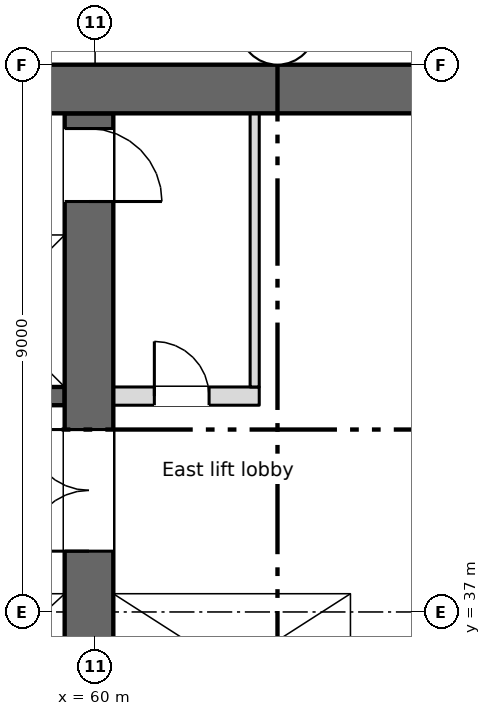
"""IFC4 building model, lengths in metres.
Left out: names, types, materials, properties, quantities, classifications, styles, units other than length and angle.
Written with IfcOpenShell. Run it as: python <this file> out.ifc"""

import sys

from ifc_helpers import new_model, si_unit, direction, frame, frame_2d, origin, place, context, subcontext, project, spatial, rectangle, extrude, element, fill, save


model = new_model("IFC4")
c1 = context("Model", 3, precision=1e-05, world=origin(), true_north=direction((0.0, 1.0)))
c2 = subcontext(c1, "Body", "Model", "MODEL_VIEW")
j1 = project(units=[si_unit("LENGTHUNIT", "METRE"), si_unit("PLANEANGLEUNIT", "RADIAN")], contexts=[c1])
p1 = place(None, origin())
s1 = spatial("IfcSite", under=j1, at=p1, CompositionType="ELEMENT")
p2 = place(p1, origin())
s2 = spatial("IfcBuilding", under=s1, at=p2, CompositionType="ELEMENT")
p3 = place(p2, frame((0.0, 0.0, 125.0)))
s3 = spatial("IfcBuildingStorey", under=s2, at=p3, CompositionType="ELEMENT", Elevation=125.0)
p4 = place(p3, frame((5.55, 45.6, 0.0), z_axis=(0.0, 0.0, 1.0), x_axis=(1.0, 0.0, 0.0)))
e1 = element("IfcWall", 1, at=p4, inside=s3, PredefinedType="SHEAR", context=c2, shape_type="SweptSolid", body=[
    extrude(rectangle(XDim=60.9, YDim=0.8, at=frame_2d((30.45, 0.0))), origin(), (0.0, 0.0, 1.0), 3.35),
])
p5 = place(p4, frame((7.2, 0.0, 0.6)))
e2 = element("IfcOpeningElement", 2, at=p5, cuts=e1, PredefinedType="OPENING", context=c2, shape_type="SweptSolid", body=[
    extrude(rectangle(XDim=0.6, YDim=2.4, at=frame_2d((0.3, 1.2))), frame((0.0, 0.41, 0.0), z_axis=(0.0, -1.0, 0.0), x_axis=(1.0, 0.0, 0.0)), (0.0, 0.0, 1.0), 0.82),
])
p6 = place(p3, frame((64.35, 34.8, 0.0), z_axis=(0.0, 0.0, 1.0), x_axis=(0.0, 1.0, 0.0)))
e3 = element("IfcWall", 3, at=p6, inside=s3, PredefinedType="SHEAR", context=c2, shape_type="SweptSolid", body=[
    extrude(rectangle(XDim=10.4, YDim=0.3, at=frame_2d((5.2, 0.0))), origin(), (0.0, 0.0, 1.0), 3.35),
])
p7 = place(p3, frame((59.9, 28.4, 0.0), z_axis=(0.0, 0.0, 1.0), x_axis=(0.0, 1.0, 0.0)))
e4 = element("IfcWall", 4, at=p7, inside=s3, PredefinedType="SHEAR", context=c2, shape_type="SweptSolid", body=[
    extrude(rectangle(XDim=16.8, YDim=0.8, at=frame_2d((8.4, 0.0))), origin(), (0.0, 0.0, 1.0), 3.35),
])
p8 = place(p7, frame((9.6, 0.0, 0.0)))
e5 = element("IfcOpeningElement", 5, at=p8, cuts=e4, PredefinedType="OPENING", context=c2, shape_type="SweptSolid", body=[
    extrude(rectangle(XDim=2.0, YDim=2.1, at=frame_2d((1.0, 1.05))), frame((0.0, 0.41, 0.0), z_axis=(0.0, -1.0, 0.0), x_axis=(1.0, 0.0, 0.0)), (0.0, 0.0, 1.0), 0.82),
])
p9 = place(p7, frame((15.35, 0.0, 0.0)))
e6 = element("IfcOpeningElement", 6, at=p9, cuts=e4, PredefinedType="OPENING", context=c2, shape_type="SweptSolid", body=[
    extrude(rectangle(XDim=1.2, YDim=2.1, at=frame_2d((0.6, 1.05))), frame((0.0, 0.41, 0.0), z_axis=(0.0, -1.0, 0.0), x_axis=(1.0, 0.0, 0.0)), (0.0, 0.0, 1.0), 0.82),
])
p10 = place(p3, frame((47.3, 37.45, 0.0), z_axis=(0.0, 0.0, 1.0), x_axis=(1.0, 0.0, 0.0)))
e7 = element("IfcWall", 7, at=p10, inside=s3, PredefinedType="SHEAR", context=c2, shape_type="SweptSolid", body=[
    extrude(rectangle(XDim=12.2, YDim=0.3, at=frame_2d((6.1, 0.0))), origin(), (0.0, 0.0, 1.0), 3.35),
])
p11 = place(p10, frame((4.3, 0.0, 0.0)))
e8 = element("IfcOpeningElement", 8, at=p11, cuts=e7, PredefinedType="OPENING", context=c2, shape_type="SweptSolid", body=[
    extrude(rectangle(XDim=1.1, YDim=2.1, at=frame_2d((0.55, 1.05))), frame((0.0, 0.16, 0.0), z_axis=(0.0, -1.0, 0.0), x_axis=(1.0, 0.0, 0.0)), (0.0, 0.0, 1.0), 0.32),
])
p12 = place(p10, frame((7.3, 0.0, 0.0)))
e9 = element("IfcOpeningElement", 9, at=p12, cuts=e7, PredefinedType="OPENING", context=c2, shape_type="SweptSolid", body=[
    extrude(rectangle(XDim=1.1, YDim=2.1, at=frame_2d((0.55, 1.05))), frame((0.0, 0.16, 0.0), z_axis=(0.0, -1.0, 0.0), x_axis=(1.0, 0.0, 0.0)), (0.0, 0.0, 1.0), 0.32),
])
p13 = place(p10, frame((10.3, 0.0, 0.0)))
e10 = element("IfcOpeningElement", 10, at=p13, cuts=e7, PredefinedType="OPENING", context=c2, shape_type="SweptSolid", body=[
    extrude(rectangle(XDim=1.1, YDim=2.1, at=frame_2d((0.55, 1.05))), frame((0.0, 0.16, 0.0), z_axis=(0.0, -1.0, 0.0), x_axis=(1.0, 0.0, 0.0)), (0.0, 0.0, 1.0), 0.32),
])
p14 = place(p3, frame((60.3, 37.45, 0.0), z_axis=(0.0, 0.0, 1.0), x_axis=(1.0, 0.0, 0.0)))
e11 = element("IfcWall", 11, at=p14, inside=s3, PredefinedType="SHEAR", context=c2, shape_type="SweptSolid", body=[
    extrude(rectangle(XDim=3.9, YDim=0.3, at=frame_2d((1.95, 0.0))), origin(), (0.0, 0.0, 1.0), 3.35),
])
p15 = place(p14, frame((1.4, 0.0, 0.0)))
e12 = element("IfcOpeningElement", 12, at=p15, cuts=e11, PredefinedType="OPENING", context=c2, shape_type="SweptSolid", body=[
    extrude(rectangle(XDim=1.1, YDim=2.1, at=frame_2d((0.55, 1.05))), frame((0.0, 0.16, 0.0), z_axis=(0.0, -1.0, 0.0), x_axis=(1.0, 0.0, 0.0)), (0.0, 0.0, 1.0), 0.32),
])
p16 = place(p3, frame((18.5, 40.55, 0.0), z_axis=(0.0, 0.0, 1.0), x_axis=(1.0, 0.0, 0.0)))
e13 = element("IfcWall", 13, at=p16, inside=s3, PredefinedType="SHEAR", context=c2, shape_type="SweptSolid", body=[
    extrude(rectangle(XDim=41.0, YDim=0.3, at=frame_2d((20.5, 0.0))), origin(), (0.0, 0.0, 1.0), 3.35),
])
p17 = place(p16, frame((18.65, 0.0, 0.0)))
e14 = element("IfcOpeningElement", 14, at=p17, cuts=e13, PredefinedType="OPENING", context=c2, shape_type="SweptSolid", body=[
    extrude(rectangle(XDim=0.9, YDim=2.1, at=frame_2d((0.45, 1.05))), frame((0.0, 0.16, 0.0), z_axis=(0.0, -1.0, 0.0), x_axis=(1.0, 0.0, 0.0)), (0.0, 0.0, 1.0), 0.32),
])
p18 = place(p16, frame((6.175, 0.0, 0.0)))
e15 = element("IfcOpeningElement", 15, at=p18, cuts=e13, PredefinedType="OPENING", context=c2, shape_type="SweptSolid", body=[
    extrude(rectangle(XDim=1.1, YDim=2.1, at=frame_2d((0.55, 1.05))), frame((0.0, 0.16, 0.0), z_axis=(0.0, -1.0, 0.0), x_axis=(1.0, 0.0, 0.0)), (0.0, 0.0, 1.0), 0.32),
])
p19 = place(p16, frame((8.925, 0.0, 0.0)))
e16 = element("IfcOpeningElement", 16, at=p19, cuts=e13, PredefinedType="OPENING", context=c2, shape_type="SweptSolid", body=[
    extrude(rectangle(XDim=1.1, YDim=2.1, at=frame_2d((0.55, 1.05))), frame((0.0, 0.16, 0.0), z_axis=(0.0, -1.0, 0.0), x_axis=(1.0, 0.0, 0.0)), (0.0, 0.0, 1.0), 0.32),
])
p20 = place(p16, frame((11.675, 0.0, 0.0)))
e17 = element("IfcOpeningElement", 17, at=p20, cuts=e13, PredefinedType="OPENING", context=c2, shape_type="SweptSolid", body=[
    extrude(rectangle(XDim=1.1, YDim=2.1, at=frame_2d((0.55, 1.05))), frame((0.0, 0.16, 0.0), z_axis=(0.0, -1.0, 0.0), x_axis=(1.0, 0.0, 0.0)), (0.0, 0.0, 1.0), 0.32),
])
p21 = place(p16, frame((30.925, 0.0, 0.0)))
e18 = element("IfcOpeningElement", 18, at=p21, cuts=e13, PredefinedType="OPENING", context=c2, shape_type="SweptSolid", body=[
    extrude(rectangle(XDim=1.1, YDim=2.1, at=frame_2d((0.55, 1.05))), frame((0.0, 0.16, 0.0), z_axis=(0.0, -1.0, 0.0), x_axis=(1.0, 0.0, 0.0)), (0.0, 0.0, 1.0), 0.32),
])
p22 = place(p16, frame((33.675, 0.0, 0.0)))
e19 = element("IfcOpeningElement", 19, at=p22, cuts=e13, PredefinedType="OPENING", context=c2, shape_type="SweptSolid", body=[
    extrude(rectangle(XDim=1.1, YDim=2.1, at=frame_2d((0.55, 1.05))), frame((0.0, 0.16, 0.0), z_axis=(0.0, -1.0, 0.0), x_axis=(1.0, 0.0, 0.0)), (0.0, 0.0, 1.0), 0.32),
])
p23 = place(p16, frame((36.375, 0.0, 0.0)))
e20 = element("IfcOpeningElement", 20, at=p23, cuts=e13, PredefinedType="OPENING", context=c2, shape_type="SweptSolid", body=[
    extrude(rectangle(XDim=1.2, YDim=2.1, at=frame_2d((0.6, 1.05))), frame((0.0, 0.16, 0.0), z_axis=(0.0, -1.0, 0.0), x_axis=(1.0, 0.0, 0.0)), (0.0, 0.0, 1.0), 0.32),
])
p24 = place(p16, frame((39.15, 0.0, 0.0)))
e21 = element("IfcOpeningElement", 21, at=p24, cuts=e13, PredefinedType="OPENING", context=c2, shape_type="SweptSolid", body=[
    extrude(rectangle(XDim=1.2, YDim=2.1, at=frame_2d((0.6, 1.05))), frame((0.0, 0.16, 0.0), z_axis=(0.0, -1.0, 0.0), x_axis=(1.0, 0.0, 0.0)), (0.0, 0.0, 1.0), 0.32),
])
p25 = place(p3, frame((18.5, 43.35, 0.0), z_axis=(0.0, 0.0, 1.0), x_axis=(1.0, 0.0, 0.0)))
e22 = element("IfcWall", 22, at=p25, inside=s3, PredefinedType="SHEAR", context=c2, shape_type="SweptSolid", body=[
    extrude(rectangle(XDim=41.0, YDim=0.3, at=frame_2d((20.5, 0.0))), origin(), (0.0, 0.0, 1.0), 3.35),
])
p26 = place(p3, frame((60.3, 40.55, 0.0), z_axis=(0.0, 0.0, 1.0), x_axis=(1.0, 0.0, 0.0)))
e23 = element("IfcWall", 23, at=p26, inside=s3, PredefinedType="PARTITIONING", context=c2, shape_type="SweptSolid", body=[
    extrude(rectangle(XDim=2.4, YDim=0.3, at=frame_2d((1.2, 0.0))), origin(), (0.0, 0.0, 1.0), 3.35),
])
p27 = place(p26, frame((0.675, 0.0, 0.0)))
e24 = element("IfcOpeningElement", 24, at=p27, cuts=e23, PredefinedType="OPENING", context=c2, shape_type="SweptSolid", body=[
    extrude(rectangle(XDim=0.9, YDim=2.1, at=frame_2d((0.45, 1.05))), frame((0.0, 0.16, 0.0), z_axis=(0.0, -1.0, 0.0), x_axis=(1.0, 0.0, 0.0)), (0.0, 0.0, 1.0), 0.32),
])
p28 = place(p3, frame((62.625, 40.7, 0.0), z_axis=(0.0, 0.0, 1.0), x_axis=(0.0, 1.0, 0.0)))
e25 = element("IfcWall", 25, at=p28, inside=s3, PredefinedType="PARTITIONING", context=c2, shape_type="SweptSolid", body=[
    extrude(rectangle(XDim=4.5, YDim=0.15, at=frame_2d((2.25, 0.0))), origin(), (0.0, 0.0, 1.0), 3.35),
])
p29 = place(p27, origin())
e26 = element("IfcDoor", 26, at=p29, inside=s3, OperationType="SINGLE_SWING_LEFT", PredefinedType="DOOR", context=c2, shape_type="SweptSolid", body=[
    extrude(rectangle(XDim=0.9, YDim=2.1, at=frame_2d((0.45, 1.05))), frame((0.0, 0.025, 0.0), z_axis=(0.0, -1.0, 0.0), x_axis=(1.0, 0.0, 0.0)), (0.0, 0.0, 1.0), 0.05),
])
fill(e24, e26)
p30 = place(p15, origin())
e27 = element("IfcDoor", 27, at=p30, inside=s3, OperationType="SLIDING_TO_LEFT", PredefinedType="DOOR", context=c2, shape_type="SweptSolid", body=[
    extrude(rectangle(XDim=1.1, YDim=2.1, at=frame_2d((0.55, 1.05))), frame((0.0, 0.025, 0.0), z_axis=(0.0, -1.0, 0.0), x_axis=(1.0, 0.0, 0.0)), (0.0, 0.0, 1.0), 0.05),
])
fill(e12, e27)
p31 = place(p8, origin())
e28 = element("IfcDoor", 28, at=p31, inside=s3, OperationType="DOUBLE_DOOR_SINGLE_SWING", PredefinedType="DOOR", context=c2, shape_type="SweptSolid", body=[
    extrude(rectangle(XDim=2.0, YDim=2.1, at=frame_2d((1.0, 1.05))), frame((0.0, 0.025, 0.0), z_axis=(0.0, -1.0, 0.0), x_axis=(1.0, 0.0, 0.0)), (0.0, 0.0, 1.0), 0.05),
])
fill(e5, e28)
p32 = place(p9, origin())
e29 = element("IfcDoor", 29, at=p32, inside=s3, OperationType="SINGLE_SWING_LEFT", PredefinedType="DOOR", context=c2, shape_type="SweptSolid", body=[
    extrude(rectangle(XDim=1.2, YDim=2.1, at=frame_2d((0.6, 1.05))), frame((0.0, 0.025, 0.0), z_axis=(0.0, -1.0, 0.0), x_axis=(1.0, 0.0, 0.0)), (0.0, 0.0, 1.0), 0.05),
])
fill(e6, e29)
save(model, sys.argv[1])
